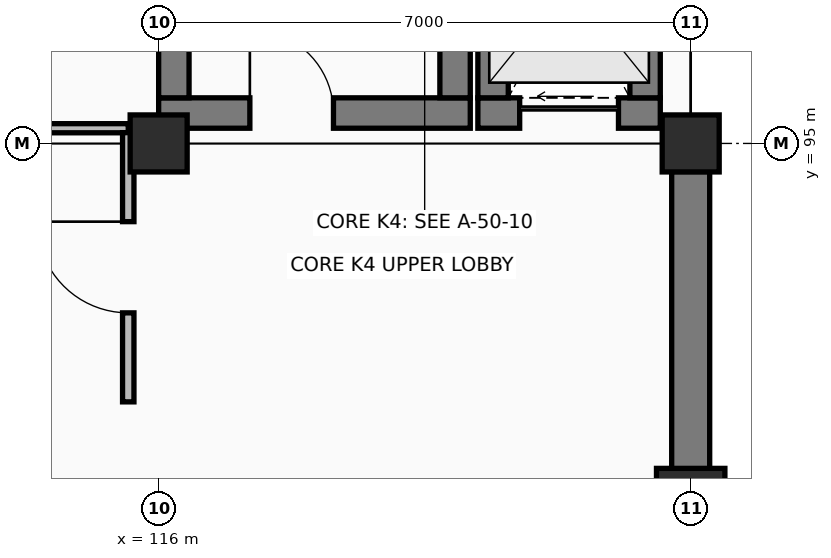
"""IFC4 building model, lengths in metres.
Left out: names, types, materials, properties, quantities, classifications, styles, units other than length and angle.
Written with IfcOpenShell. Run it as: python <this file> out.ifc"""

import sys

from ifc_helpers import new_model, si_unit, direction, frame, frame_2d, origin, origin_2d, place, context, subcontext, project, spatial, rectangle, extrude, element, fill, save


model = new_model("IFC4")
c1 = context("Model", 3, precision=1e-05, world=origin(), true_north=direction((0.0, 1.0)))
c2 = subcontext(c1, "Body", "Model", "MODEL_VIEW")
j1 = project(units=[si_unit("LENGTHUNIT", "METRE"), si_unit("PLANEANGLEUNIT", "RADIAN")], contexts=[c1])
p1 = place(None, origin())
s1 = spatial("IfcSite", under=j1, at=p1, CompositionType="ELEMENT")
p2 = place(p1, origin())
s2 = spatial("IfcBuilding", under=s1, at=p2, CompositionType="ELEMENT")
p3 = place(p2, frame((0.0, 0.0, 9.6)))
s3 = spatial("IfcBuildingStorey", under=s2, at=p3, CompositionType="ELEMENT", Elevation=9.6)
for number, where, z_axis, x_axis in (
    (1, (116.0, 95.0, 0.0), (0.0, 0.0, 1.0), (1.0, 0.0, 0.0)),
    (2, (123.0, 95.0, 0.0), (0.0, 0.0, 1.0), (1.0, 0.0, 0.0)),
):
    element("IfcColumn", number, at=place(p3, frame(where, z_axis=z_axis, x_axis=x_axis)), inside=s3, PredefinedType="COLUMN", context=c2, shape_type="SweptSolid", body=[
        extrude(rectangle(XDim=0.75, YDim=0.75, at=origin_2d()), origin(), (0.0, 0.0, 1.0), 4.8),
    ])
p4 = place(p3, frame((123.0, 90.5, 0.0), z_axis=(0.0, 0.0, 1.0), x_axis=(0.0, 1.0, 0.0)))
e3 = element("IfcColumn", 3, at=p4, inside=s3, PredefinedType="PILASTER", context=c2, shape_type="SweptSolid", body=[
    extrude(rectangle(XDim=0.45, YDim=0.9, at=origin_2d()), origin(), (0.0, 0.0, 1.0), 4.8),
])
p5 = place(p3, frame((123.0, 90.72, 0.0), z_axis=(0.0, 0.0, 1.0), x_axis=(0.0, 1.0, 0.0)))
e4 = element("IfcWall", 4, at=p5, inside=s3, PredefinedType="SHEAR", context=c2, shape_type="SweptSolid", body=[
    extrude(rectangle(XDim=3.91, YDim=0.5, at=frame_2d((1.955, 0.0))), origin(), (0.0, 0.0, 1.0), 2.752),
])
p6 = place(p3, frame((116.0, 95.4, 0.0), z_axis=(0.0, 0.0, 1.0), x_axis=(1.0, 0.0, 0.0)))
e5 = element("IfcWall", 5, at=p6, inside=s3, PredefinedType="SHEAR", context=c2, shape_type="SweptSolid", body=[
    extrude(rectangle(XDim=4.1, YDim=0.4, at=frame_2d((2.05, 0.0))), origin(), (0.0, 0.0, 1.0), 4.49),
])
p7 = place(p6, frame((1.2, 0.0, 0.0)))
e6 = element("IfcOpeningElement", 6, at=p7, cuts=e5, PredefinedType="OPENING", context=c2, shape_type="SweptSolid", body=[
    extrude(rectangle(XDim=1.1, YDim=2.2, at=frame_2d((0.55, 1.1))), frame((0.0, 0.21, 0.0), z_axis=(0.0, -1.0, 0.0), x_axis=(1.0, 0.0, 0.0)), (0.0, 0.0, 1.0), 0.42),
])
for number, where, z_axis, x_axis in (
    (7, (119.9, 95.6, 0.0), (0.0, 0.0, 1.0), (0.0, 1.0, 0.0)),
    (8, (116.2, 103.0, 0.0), (0.0, 0.0, 1.0), (0.0, -1.0, 0.0)),
):
    element("IfcWall", number, at=place(p3, frame(where, z_axis=z_axis, x_axis=x_axis)), inside=s3, PredefinedType="SHEAR", context=c2, shape_type="SweptSolid", body=[
        extrude(rectangle(XDim=7.4, YDim=0.4, at=frame_2d((3.7, 0.0))), origin(), (0.0, 0.0, 1.0), 4.49),
    ])
p8 = place(p3, frame((120.2, 95.4, 0.0), z_axis=(0.0, 0.0, 1.0), x_axis=(1.0, 0.0, 0.0)))
e9 = element("IfcWall", 9, at=p8, inside=s3, PredefinedType="SHEAR", context=c2, shape_type="SweptSolid", body=[
    extrude(rectangle(XDim=2.4, YDim=0.4, at=frame_2d((1.2, 0.0))), origin(), (0.0, 0.0, 1.0), 4.49),
])
p9 = place(p8, frame((0.55, 0.0, 0.0)))
e10 = element("IfcOpeningElement", 10, at=p9, cuts=e9, PredefinedType="OPENING", context=c2, shape_type="SweptSolid", body=[
    extrude(rectangle(XDim=1.3, YDim=2.25, at=frame_2d((0.65, 1.125))), frame((0.0, 0.21, 0.0), z_axis=(0.0, -1.0, 0.0), x_axis=(1.0, 0.0, 0.0)), (0.0, 0.0, 1.0), 0.42),
])
for number, where, z_axis, x_axis in (
    (11, (122.4, 95.6, 0.0), (0.0, 0.0, 1.0), (0.0, 1.0, 0.0)),
    (12, (120.4, 98.6, 0.0), (0.0, 0.0, 1.0), (0.0, -1.0, 0.0)),
):
    element("IfcWall", number, at=place(p3, frame(where, z_axis=z_axis, x_axis=x_axis)), inside=s3, PredefinedType="SHEAR", context=c2, shape_type="SweptSolid", body=[
        extrude(rectangle(XDim=3.0, YDim=0.4, at=frame_2d((1.5, 0.0))), origin(), (0.0, 0.0, 1.0), 4.49),
    ])
p10 = place(p3, frame((95.2, 95.2, 0.0), z_axis=(0.0, 0.0, 1.0), x_axis=(1.0, 0.0, 0.0)))
e13 = element("IfcWall", 13, at=p10, inside=s3, PredefinedType="PARTITIONING", context=c2, shape_type="SweptSolid", body=[
    extrude(rectangle(XDim=20.4, YDim=0.12, at=frame_2d((10.2, 0.0))), origin(), (0.0, 0.0, 1.0), 3.315),
])
p11 = place(p10, frame((9.65, 0.0, 0.0)))
e14 = element("IfcOpeningElement", 14, at=p11, cuts=e13, PredefinedType="OPENING", context=c2, shape_type="SweptSolid", body=[
    extrude(rectangle(XDim=1.1, YDim=2.2, at=frame_2d((0.55, 1.1))), frame((0.0, 0.07, 0.0), z_axis=(0.0, -1.0, 0.0), x_axis=(1.0, 0.0, 0.0)), (0.0, 0.0, 1.0), 0.14),
])
p12 = place(p3, frame((115.6, 91.6, 0.0), z_axis=(0.0, 0.0, 1.0), x_axis=(0.0, 1.0, 0.0)))
e15 = element("IfcWall", 15, at=p12, inside=s3, PredefinedType="PARTITIONING", context=c2, shape_type="SweptSolid", body=[
    extrude(rectangle(XDim=3.542, YDim=0.15, at=frame_2d((1.771, 0.0))), origin(), (0.0, 0.0, 1.0), 3.315),
])
p13 = place(p12, frame((1.171, 0.0, 0.0)))
e16 = element("IfcOpeningElement", 16, at=p13, cuts=e15, PredefinedType="OPENING", context=c2, shape_type="SweptSolid", body=[
    extrude(rectangle(XDim=1.2, YDim=2.2, at=frame_2d((0.6, 1.1))), frame((0.0, 0.085, 0.0), z_axis=(0.0, -1.0, 0.0), x_axis=(1.0, 0.0, 0.0)), (0.0, 0.0, 1.0), 0.17),
])
p14 = place(p7, origin())
e17 = element("IfcDoor", 17, at=p14, inside=s3, OperationType="SINGLE_SWING_LEFT", PredefinedType="DOOR", context=c2, shape_type="SweptSolid", body=[
    extrude(rectangle(XDim=1.1, YDim=2.2, at=frame_2d((0.55, 1.1))), frame((0.0, 0.025, 0.0), z_axis=(0.0, -1.0, 0.0), x_axis=(1.0, 0.0, 0.0)), (0.0, 0.0, 1.0), 0.05),
])
fill(e6, e17)
p15 = place(p9, origin())
e18 = element("IfcDoor", 18, at=p15, inside=s3, OperationType="SLIDING_TO_LEFT", PredefinedType="DOOR", context=c2, shape_type="SweptSolid", body=[
    extrude(rectangle(XDim=1.3, YDim=2.25, at=frame_2d((0.65, 1.125))), frame((0.0, 0.025, 0.0), z_axis=(0.0, -1.0, 0.0), x_axis=(1.0, 0.0, 0.0)), (0.0, 0.0, 1.0), 0.05),
])
fill(e10, e18)
p16 = place(p13, origin())
e19 = element("IfcDoor", 19, at=p16, inside=s3, OperationType="SINGLE_SWING_RIGHT", PredefinedType="DOOR", context=c2, shape_type="SweptSolid", body=[
    extrude(rectangle(XDim=1.2, YDim=2.2, at=frame_2d((0.6, 1.1))), frame((0.0, 0.025, 0.0), z_axis=(0.0, -1.0, 0.0), x_axis=(1.0, 0.0, 0.0)), (0.0, 0.0, 1.0), 0.05),
])
fill(e16, e19)
save(model, sys.argv[1])
